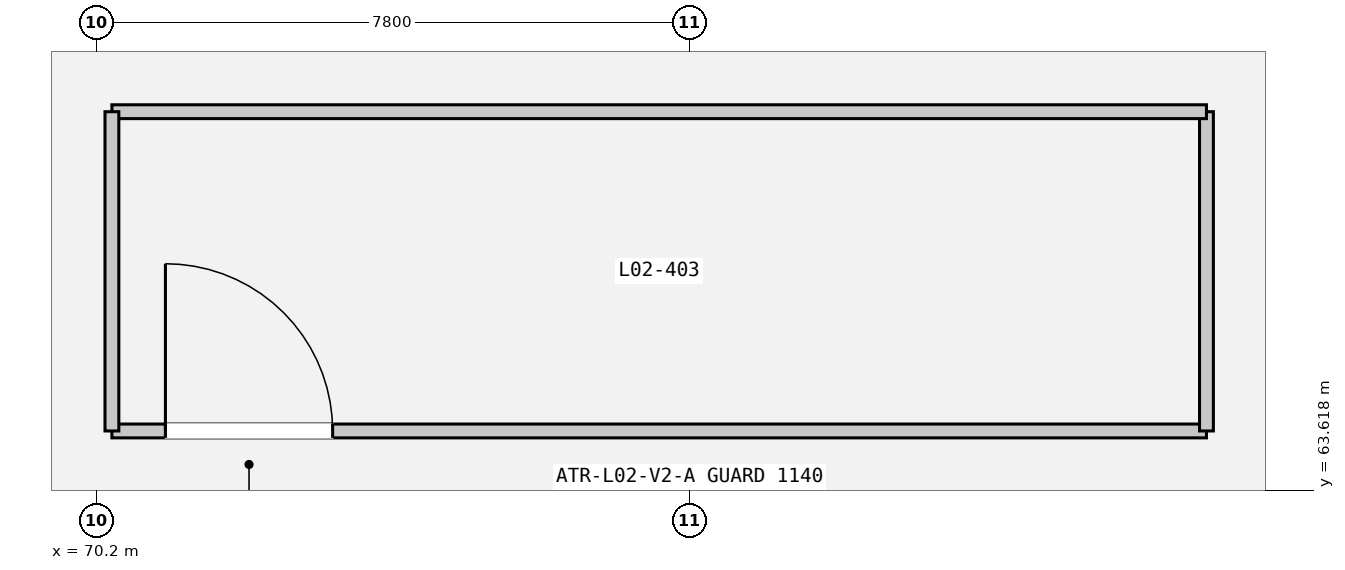
"""IFC4 building model, lengths in metres.
Left out: names, types, materials, properties, quantities, classifications, styles, units other than length and angle.
Written with IfcOpenShell. Run it as: python <this file> out.ifc"""

import sys

from ifc_helpers import new_model, si_unit, direction, frame, frame_2d, origin, place, context, subcontext, project, spatial, rectangle, extrude, element, fill, save


model = new_model("IFC4")
c1 = context("Model", 3, precision=1e-05, world=origin(), true_north=direction((0.0, 1.0)))
c2 = subcontext(c1, "Body", "Model", "MODEL_VIEW")
j1 = project(units=[si_unit("LENGTHUNIT", "METRE"), si_unit("PLANEANGLEUNIT", "RADIAN")], contexts=[c1])
p1 = place(None, origin())
s1 = spatial("IfcSite", under=j1, at=p1, CompositionType="ELEMENT")
p2 = place(p1, origin())
s2 = spatial("IfcBuilding", under=s1, at=p2, CompositionType="ELEMENT")
p3 = place(p2, frame((0.0, 0.0, 10.2)))
s3 = spatial("IfcBuildingStorey", under=s2, at=p3, CompositionType="ELEMENT", Elevation=10.2)
p4 = place(p3, frame((70.4, 64.4, 0.0), z_axis=(0.0, 0.0, 1.0), x_axis=(1.0, 0.0, 0.0)))
e1 = element("IfcWall", 1, at=p4, inside=s3, PredefinedType="PARTITIONING", context=c2, shape_type="SweptSolid", body=[
    extrude(rectangle(XDim=14.4, YDim=0.182, at=frame_2d((7.2, 0.0))), origin(), (0.0, 0.0, 1.0), 3.45),
])
p5 = place(p4, frame((0.704, 0.0, 0.0)))
e2 = element("IfcOpeningElement", 2, at=p5, cuts=e1, PredefinedType="OPENING", context=c2, shape_type="SweptSolid", body=[
    extrude(rectangle(XDim=2.2, YDim=2.5, at=frame_2d((1.1, 1.25))), frame((0.0, 0.101, 0.0), z_axis=(0.0, -1.0, 0.0), x_axis=(1.0, 0.0, 0.0)), (0.0, 0.0, 1.0), 0.202),
])
p6 = place(p3, frame((84.8, 64.4, 0.0), z_axis=(0.0, 0.0, 1.0), x_axis=(0.0, 1.0, 0.0)))
e3 = element("IfcWall", 3, at=p6, inside=s3, PredefinedType="PARTITIONING", context=c2, shape_type="SweptSolid", body=[
    extrude(rectangle(XDim=4.2, YDim=0.182, at=frame_2d((2.1, 0.0))), origin(), (0.0, 0.0, 1.0), 3.45),
])
p7 = place(p3, frame((84.8, 68.6, 0.0), z_axis=(0.0, 0.0, 1.0), x_axis=(-1.0, 0.0, 0.0)))
e4 = element("IfcWall", 4, at=p7, inside=s3, PredefinedType="PARTITIONING", context=c2, shape_type="SweptSolid", body=[
    extrude(rectangle(XDim=14.4, YDim=0.182, at=frame_2d((7.2, 0.0))), origin(), (0.0, 0.0, 1.0), 3.45),
])
p8 = place(p3, frame((70.4, 68.6, 0.0), z_axis=(0.0, 0.0, 1.0), x_axis=(0.0, -1.0, 0.0)))
e5 = element("IfcWall", 5, at=p8, inside=s3, PredefinedType="PARTITIONING", context=c2, shape_type="SweptSolid", body=[
    extrude(rectangle(XDim=4.2, YDim=0.182, at=frame_2d((2.1, 0.0))), origin(), (0.0, 0.0, 1.0), 3.45),
])
p9 = place(p5, origin())
e6 = element("IfcDoor", 6, at=p9, inside=s3, OperationType="DOUBLE_DOOR_SINGLE_SWING", PredefinedType="DOOR", context=c2, shape_type="SweptSolid", body=[
    extrude(rectangle(XDim=2.2, YDim=2.5, at=frame_2d((1.1, 1.25))), frame((0.0, 0.025, 0.0), z_axis=(0.0, -1.0, 0.0), x_axis=(1.0, 0.0, 0.0)), (0.0, 0.0, 1.0), 0.05),
])
fill(e2, e6)
save(model, sys.argv[1])
